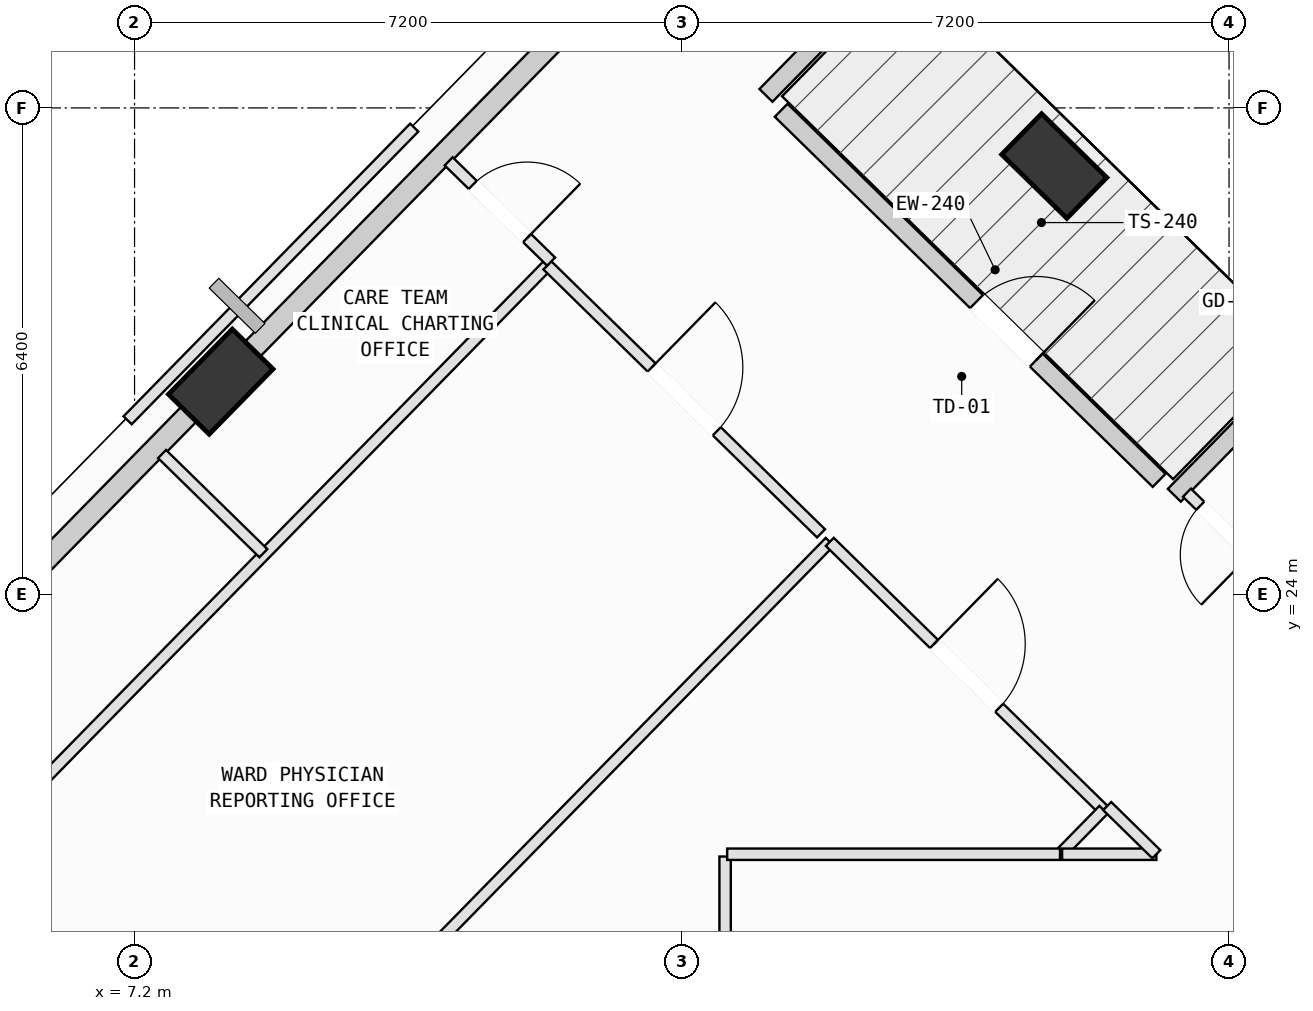
"""IFC4 building model, lengths in metres.
Left out: names, types, materials, properties, quantities, classifications, styles, units other than length and angle.
Written with IfcOpenShell. Run it as: python <this file> out.ifc"""

import sys

from ifc_helpers import new_model, si_unit, direction, frame, frame_2d, origin, origin_2d, place, context, subcontext, project, spatial, rectangle, extrude, element, fill, save


model = new_model("IFC4")
c1 = context("Model", 3, precision=1e-05, world=origin(), true_north=direction((0.0, 1.0)))
c2 = subcontext(c1, "Body", "Model", "MODEL_VIEW")
j1 = project(units=[si_unit("LENGTHUNIT", "METRE"), si_unit("PLANEANGLEUNIT", "RADIAN")], contexts=[c1])
p1 = place(None, origin())
s1 = spatial("IfcSite", under=j1, at=p1, CompositionType="ELEMENT")
p2 = place(p1, origin())
s2 = spatial("IfcBuilding", under=s1, at=p2, CompositionType="ELEMENT")
p3 = place(p2, frame((0.0, 0.0, 219.2)))
s3 = spatial("IfcBuildingStorey", under=s2, at=p3, CompositionType="ELEMENT", Elevation=219.2)
p4 = place(p3, frame((19.3, 29.635, 0.002), z_axis=(-0.019510987692, -0.059325596951, 0.998047992286), x_axis=(-0.460549166871, 0.886558064773, 0.043695110491)))
e1 = element("IfcColumn", 1, at=p4, inside=s3, PredefinedType="COLUMN", context=c2, shape_type="SweptSolid", body=[
    extrude(rectangle(XDim=1.2, YDim=0.75, at=origin_2d()), origin(), (0.0, 0.0, 1.0), 4.004),
])
p5 = place(p3, frame((8.334, 26.798, 0.002), z_axis=(-0.007351582684, -0.104198052093, 0.994529396334), x_axis=(0.747937181643, 0.659560518907, 0.074631723923)))
e2 = element("IfcColumn", 2, at=p5, inside=s3, PredefinedType="COLUMN", context=c2, shape_type="SweptSolid", body=[
    extrude(rectangle(XDim=1.2, YDim=0.75, at=origin_2d()), origin(), (0.0, 0.0, 1.0), 4.018),
])
p6 = place(p3, frame((15.708, 30.369, 0.0), z_axis=(0.0, 0.0, 1.0), x_axis=(0.71445197499, -0.699684482773, 0.0)))
e3 = element("IfcWall", 3, at=p6, inside=s3, PredefinedType="SOLIDWALL", context=c2, shape_type="SweptSolid", body=[
    extrude(rectangle(XDim=6.96, YDim=0.24, at=frame_2d((3.48, 0.0))), origin(), (0.0, 0.0, 1.0), 3.265),
])
p7 = place(p6, frame((3.597, 0.0, 0.0)))
e4 = element("IfcOpeningElement", 4, at=p7, cuts=e3, PredefinedType="OPENING", context=c2, shape_type="SweptSolid", body=[
    extrude(rectangle(XDim=1.1, YDim=2.15, at=frame_2d((0.55, 1.075))), frame((0.0, 0.13, 0.0), z_axis=(0.0, -1.0, 0.0), x_axis=(1.0, 0.0, 0.0)), (0.0, 0.0, 1.0), 0.26),
])
p8 = place(p3, frame((20.88, 25.303, 0.0), z_axis=(0.0, 0.0, 1.0), x_axis=(0.699645566709, 0.714490084595, 0.0)))
e5 = element("IfcWall", 5, at=p8, inside=s3, PredefinedType="SOLIDWALL", context=c2, shape_type="SweptSolid", body=[
    extrude(rectangle(XDim=2.5, YDim=0.24, at=frame_2d((1.25, 0.0))), origin(), (0.0, 0.0, 1.0), 3.265),
])
p9 = place(p3, frame((17.257, 32.351, 0.0), z_axis=(0.0, 0.0, 1.0), x_axis=(-0.699695417311, -0.714441266301, 0.0)))
e6 = element("IfcWall", 6, at=p9, inside=s3, PredefinedType="SOLIDWALL", context=c2, shape_type="SweptSolid", body=[
    extrude(rectangle(XDim=2.5, YDim=0.24, at=frame_2d((1.25, 0.0))), origin(), (0.0, 0.0, 1.0), 3.265),
])
p10 = place(p3, frame((8.483, 26.951, 0.0), z_axis=(0.0, 0.0, 1.0), x_axis=(0.699662514677, 0.714473488351, 0.0)))
e7 = element("IfcWall", 7, at=p10, inside=s3, PredefinedType="SOLIDWALL", context=c2, shape_type="SweptSolid", body=[
    extrude(rectangle(XDim=7.434, YDim=0.28, at=frame_2d((3.717, 0.0))), origin(), (0.0, 0.0, 1.0), 3.265),
])
p11 = place(p3, frame((2.724, 21.069, 0.0), z_axis=(0.0, 0.0, 1.0), x_axis=(0.699663647381, 0.714472379125, 0.0)))
e8 = element("IfcWall", 8, at=p11, inside=s3, PredefinedType="SOLIDWALL", context=c2, shape_type="SweptSolid", body=[
    extrude(rectangle(XDim=7.485, YDim=0.28, at=frame_2d((3.742, 0.0))), origin(), (0.0, 0.0, 1.0), 3.265),
])
p12 = place(p3, frame((14.97, 20.55, 0.0), z_axis=(0.0, 0.0, 1.0), x_axis=(0.0, -1.0, 0.0)))
e9 = element("IfcWall", 9, at=p12, inside=s3, PredefinedType="PARTITIONING", context=c2, shape_type="SweptSolid", body=[
    extrude(rectangle(XDim=2.32, YDim=0.15, at=frame_2d((1.16, 0.0))), origin(), (0.0, 0.0, 1.0), 3.78),
])
p13 = place(p3, frame((5.723, 13.841, 0.0), z_axis=(0.0, 0.0, 1.0), x_axis=(0.69966395239, 0.714472080438, 0.0)))
e10 = element("IfcWall", 10, at=p13, inside=s3, PredefinedType="PARTITIONING", context=c2, shape_type="SweptSolid", body=[
    extrude(rectangle(XDim=15.185, YDim=0.15, at=frame_2d((7.592, 0.0))), origin(), (0.0, 0.0, 1.0), 3.78),
])
p14 = place(p3, frame((16.347, 24.69, 0.0), z_axis=(0.0, 0.0, 1.0), x_axis=(0.714527579213, -0.699607274508, 0.0)))
e11 = element("IfcWall", 11, at=p14, inside=s3, PredefinedType="PARTITIONING", context=c2, shape_type="SweptSolid", body=[
    extrude(rectangle(XDim=5.04, YDim=0.15, at=frame_2d((2.52, 0.0))), origin(), (0.0, 0.0, 1.0), 3.78),
])
p15 = place(p14, frame((1.92, 0.0, 0.0)))
e12 = element("IfcOpeningElement", 12, at=p15, cuts=e11, PredefinedType="OPENING", context=c2, shape_type="SweptSolid", body=[
    extrude(rectangle(XDim=1.2, YDim=2.15, at=frame_2d((0.6, 1.075))), frame((0.0, 0.085, 0.0), z_axis=(0.0, -1.0, 0.0), x_axis=(1.0, 0.0, 0.0)), (0.0, 0.0, 1.0), 0.17),
])
p16 = place(p3, frame((19.948, 21.164, 0.0), z_axis=(0.0, 0.0, 1.0), x_axis=(-0.699751841197, -0.714386002622, 0.0)))
e13 = element("IfcWall", 13, at=p16, inside=s3, PredefinedType="PARTITIONING", context=c2, shape_type="SweptSolid", body=[
    extrude(rectangle(XDim=0.817, YDim=0.15, at=frame_2d((0.409, 0.0))), origin(), (0.0, 0.0, 1.0), 3.78),
])
p17 = place(p3, frame((19.376, 20.58, 0.0), z_axis=(0.0, 0.0, 1.0), x_axis=(-1.0, 0.0, 0.0)))
e14 = element("IfcWall", 14, at=p17, inside=s3, PredefinedType="PARTITIONING", context=c2, shape_type="SweptSolid", body=[
    extrude(rectangle(XDim=4.379, YDim=0.15, at=frame_2d((2.189, 0.0))), origin(), (0.0, 0.0, 1.0), 3.78),
])
p18 = place(p3, frame((3.136, 18.633, 0.0), z_axis=(0.0, 0.0, 1.0), x_axis=(0.699746859046, 0.71439088268, 0.0)))
e15 = element("IfcWall", 15, at=p18, inside=s3, PredefinedType="PARTITIONING", context=c2, shape_type="SweptSolid", body=[
    extrude(rectangle(XDim=13.571, YDim=0.15, at=frame_2d((6.785, 0.0))), origin(), (0.0, 0.0, 1.0), 3.78),
])
p19 = place(p3, frame((12.632, 28.328, 0.0), z_axis=(0.0, 0.0, 1.0), x_axis=(0.714408997324, -0.699728364826, 0.0)))
e16 = element("IfcWall", 16, at=p19, inside=s3, PredefinedType="PARTITIONING", context=c2, shape_type="SweptSolid", body=[
    extrude(rectangle(XDim=5.039, YDim=0.15, at=frame_2d((2.52, 0.0))), origin(), (0.0, 0.0, 1.0), 3.78),
])
p20 = place(p19, frame((1.92, 0.0, 0.0)))
e17 = element("IfcOpeningElement", 17, at=p20, cuts=e16, PredefinedType="OPENING", context=c2, shape_type="SweptSolid", body=[
    extrude(rectangle(XDim=1.2, YDim=2.15, at=frame_2d((0.6, 1.075))), frame((0.0, 0.085, 0.0), z_axis=(0.0, -1.0, 0.0), x_axis=(1.0, 0.0, 0.0)), (0.0, 0.0, 1.0), 0.17),
])
p21 = place(p3, frame((20.644, 20.58, 0.0), z_axis=(0.0, 0.0, 1.0), x_axis=(-1.0, 0.0, 0.0)))
e18 = element("IfcWall", 18, at=p21, inside=s3, PredefinedType="PARTITIONING", context=c2, shape_type="SweptSolid", body=[
    extrude(rectangle(XDim=1.24, YDim=0.15, at=frame_2d((0.62, 0.0))), origin(), (0.0, 0.0, 1.0), 3.78),
])
p22 = place(p3, frame((8.895, 24.541, 0.0), z_axis=(0.0, 0.0, 1.0), x_axis=(-0.714592202045, 0.699541267386, 0.0)))
e19 = element("IfcWall", 19, at=p22, inside=s3, PredefinedType="PARTITIONING", context=c2, shape_type="SweptSolid", body=[
    extrude(rectangle(XDim=1.865, YDim=0.15, at=frame_2d((0.933, 0.0))), origin(), (0.0, 0.0, 1.0), 3.78),
])
p23 = place(p3, frame((7.109, 26.29, 0.0), z_axis=(0.0, 0.0, 1.0), x_axis=(0.699639245375, 0.71449627454, 0.0)))
e20 = element("IfcWall", 20, at=p23, inside=s3, PredefinedType="PARTITIONING", context=c2, shape_type="SweptSolid", body=[
    extrude(rectangle(XDim=5.39, YDim=0.15, at=frame_2d((2.695, 0.0))), origin(), (0.0, 0.0, 1.0), 3.78),
])
p24 = place(p3, frame((11.333, 29.697, 0.0), z_axis=(0.0, 0.0, 1.0), x_axis=(0.714703185828, -0.699427877745, 0.0)))
e21 = element("IfcWall", 21, at=p24, inside=s3, PredefinedType="PARTITIONING", context=c2, shape_type="SweptSolid", body=[
    extrude(rectangle(XDim=1.886, YDim=0.15, at=frame_2d((0.943, 0.0))), origin(), (0.0, 0.0, 1.0), 3.78),
])
p25 = place(p24, frame((0.443, 0.0, 0.0)))
e22 = element("IfcOpeningElement", 22, at=p25, cuts=e21, PredefinedType="OPENING", context=c2, shape_type="SweptSolid", body=[
    extrude(rectangle(XDim=1.0, YDim=2.12, at=frame_2d((0.5, 1.06))), frame((0.0, 0.085, 0.0), z_axis=(0.0, -1.0, 0.0), x_axis=(1.0, 0.0, 0.0)), (0.0, 0.0, 1.0), 0.17),
])
p26 = place(p3, frame((19.997, 21.214, 0.0), z_axis=(0.0, 0.0, 1.0), x_axis=(0.714212839143, -0.69992858236, 0.0)))
e23 = element("IfcWall", 23, at=p26, inside=s3, PredefinedType="PARTITIONING", context=c2, shape_type="SweptSolid", body=[
    extrude(rectangle(XDim=0.906, YDim=0.15, at=frame_2d((0.453, 0.0))), origin(), (0.0, 0.0, 1.0), 3.78),
])
p27 = place(p3, frame((22.054, 24.35, 0.0), z_axis=(0.0, 0.0, 1.0), x_axis=(-0.714595133376, 0.699538272973, 0.0)))
e24 = element("IfcWall", 24, at=p27, inside=s3, PredefinedType="PARTITIONING", context=c2, shape_type="SweptSolid", body=[
    extrude(rectangle(XDim=1.411, YDim=0.15, at=frame_2d((0.705, 0.0))), origin(), (0.0, 0.0, 1.0), 3.78),
])
p28 = place(p27, frame((0.245, 0.0, 0.0)))
e25 = element("IfcOpeningElement", 25, at=p28, cuts=e24, PredefinedType="OPENING", context=c2, shape_type="SweptSolid", body=[
    extrude(rectangle(XDim=0.92, YDim=2.1, at=frame_2d((0.46, 1.05))), frame((0.0, 0.085, 0.0), z_axis=(0.0, -1.0, 0.0), x_axis=(1.0, 0.0, 0.0)), (0.0, 0.0, 1.0), 0.17),
])
p29 = place(p7, origin())
e26 = element("IfcDoor", 26, at=p29, inside=s3, OperationType="SINGLE_SWING_RIGHT", PredefinedType="DOOR", context=c2, shape_type="SweptSolid", body=[
    extrude(rectangle(XDim=1.1, YDim=2.15, at=frame_2d((0.55, 1.075))), frame((0.0, 0.025, 0.0), z_axis=(0.0, -1.0, 0.0), x_axis=(1.0, 0.0, 0.0)), (0.0, 0.0, 1.0), 0.05),
])
fill(e4, e26)
p30 = place(p15, origin())
e27 = element("IfcDoor", 27, at=p30, inside=s3, OperationType="SINGLE_SWING_LEFT", PredefinedType="DOOR", context=c2, shape_type="SweptSolid", body=[
    extrude(rectangle(XDim=1.2, YDim=2.15, at=frame_2d((0.6, 1.075))), frame((0.0, 0.025, 0.0), z_axis=(0.0, -1.0, 0.0), x_axis=(1.0, 0.0, 0.0)), (0.0, 0.0, 1.0), 0.05),
])
fill(e12, e27)
p31 = place(p20, origin())
e28 = element("IfcDoor", 28, at=p31, inside=s3, OperationType="SINGLE_SWING_LEFT", PredefinedType="DOOR", context=c2, shape_type="SweptSolid", body=[
    extrude(rectangle(XDim=1.2, YDim=2.15, at=frame_2d((0.6, 1.075))), frame((0.0, 0.025, 0.0), z_axis=(0.0, -1.0, 0.0), x_axis=(1.0, 0.0, 0.0)), (0.0, 0.0, 1.0), 0.05),
])
fill(e17, e28)
p32 = place(p25, origin())
e29 = element("IfcDoor", 29, at=p32, inside=s3, OperationType="SINGLE_SWING_RIGHT", PredefinedType="DOOR", context=c2, shape_type="SweptSolid", body=[
    extrude(rectangle(XDim=1.0, YDim=2.12, at=frame_2d((0.5, 1.06))), frame((0.0, 0.025, 0.0), z_axis=(0.0, -1.0, 0.0), x_axis=(1.0, 0.0, 0.0)), (0.0, 0.0, 1.0), 0.05),
])
fill(e22, e29)
p33 = place(p28, origin())
e30 = element("IfcDoor", 30, at=p33, inside=s3, OperationType="SINGLE_SWING_LEFT", PredefinedType="DOOR", context=c2, shape_type="SweptSolid", body=[
    extrude(rectangle(XDim=0.92, YDim=2.1, at=frame_2d((0.46, 1.05))), frame((0.0, 0.025, 0.0), z_axis=(0.0, -1.0, 0.0), x_axis=(1.0, 0.0, 0.0)), (0.0, 0.0, 1.0), 0.05),
])
fill(e25, e30)
save(model, sys.argv[1])
